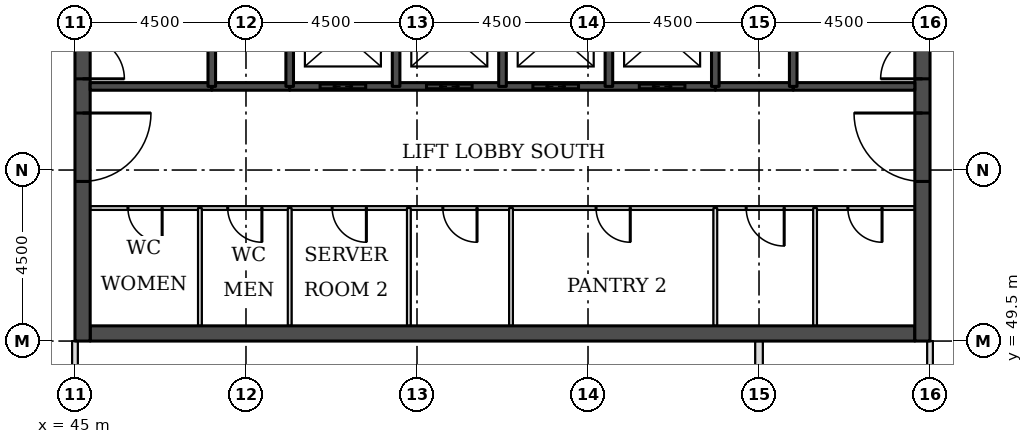
"""IFC4 building model, lengths in metres.
Left out: names, types, materials, properties, quantities, classifications, styles, units other than length and angle.
Written with IfcOpenShell. Run it as: python <this file> out.ifc"""

import sys

from ifc_helpers import new_model, si_unit, direction, frame, frame_2d, origin, place, context, subcontext, project, spatial, rectangle, extrude, element, fill, save


model = new_model("IFC4")
c1 = context("Model", 3, precision=1e-05, world=origin(), true_north=direction((0.0, 1.0)))
c2 = subcontext(c1, "Body", "Model", "MODEL_VIEW")
j1 = project(units=[si_unit("LENGTHUNIT", "METRE"), si_unit("PLANEANGLEUNIT", "RADIAN")], contexts=[c1])
p1 = place(None, origin())
s1 = spatial("IfcSite", under=j1, at=p1, CompositionType="ELEMENT")
p2 = place(p1, origin())
s2 = spatial("IfcBuilding", under=s1, at=p2, CompositionType="ELEMENT")
p3 = place(p2, frame((0.0, 0.0, 181.0)))
s3 = spatial("IfcBuildingStorey", under=s2, at=p3, CompositionType="ELEMENT", Elevation=181.0)
p4 = place(p3, frame((45.4, 49.7, 0.0), z_axis=(0.0, 0.0, 1.0), x_axis=(1.0, 0.0, 0.0)))
e1 = element("IfcWall", 1, at=p4, inside=s3, PredefinedType="SHEAR", context=c2, shape_type="SweptSolid", body=[
    extrude(rectangle(XDim=21.7, YDim=0.4, at=frame_2d((10.85, 0.0))), origin(), (0.0, 0.0, 1.0), 3.7),
])
p5 = place(p3, frame((45.2, 49.5, 0.0), z_axis=(0.0, 0.0, 1.0), x_axis=(0.0, 1.0, 0.0)))
e2 = element("IfcWall", 2, at=p5, inside=s3, PredefinedType="SHEAR", context=c2, shape_type="SweptSolid", body=[
    extrude(rectangle(XDim=22.5, YDim=0.4, at=frame_2d((11.25, 0.0))), origin(), (0.0, 0.0, 1.0), 3.7),
])
p6 = place(p5, frame((4.2, 0.0, 0.0)))
e3 = element("IfcOpeningElement", 3, at=p6, cuts=e2, PredefinedType="OPENING", context=c2, shape_type="SweptSolid", body=[
    extrude(rectangle(XDim=1.8, YDim=2.1, at=frame_2d((0.9, 1.05))), frame((0.0, 0.21, 0.0), z_axis=(0.0, -1.0, 0.0), x_axis=(1.0, 0.0, 0.0)), (0.0, 0.0, 1.0), 0.42),
])
p7 = place(p5, frame((6.9, 0.0, 0.0)))
e4 = element("IfcOpeningElement", 4, at=p7, cuts=e2, PredefinedType="OPENING", context=c2, shape_type="SweptSolid", body=[
    extrude(rectangle(XDim=1.1, YDim=2.1, at=frame_2d((0.55, 1.05))), frame((0.0, 0.21, 0.0), z_axis=(0.0, -1.0, 0.0), x_axis=(1.0, 0.0, 0.0)), (0.0, 0.0, 1.0), 0.42),
])
p8 = place(p5, frame((13.6, 0.0, 0.0)))
e5 = element("IfcOpeningElement", 5, at=p8, cuts=e2, PredefinedType="OPENING", context=c2, shape_type="SweptSolid", body=[
    extrude(rectangle(XDim=1.1, YDim=2.1, at=frame_2d((0.55, 1.05))), frame((0.0, 0.21, 0.0), z_axis=(0.0, -1.0, 0.0), x_axis=(1.0, 0.0, 0.0)), (0.0, 0.0, 1.0), 0.42),
])
p9 = place(p5, frame((16.5, 0.0, 0.0)))
e6 = element("IfcOpeningElement", 6, at=p9, cuts=e2, PredefinedType="OPENING", context=c2, shape_type="SweptSolid", body=[
    extrude(rectangle(XDim=1.8, YDim=2.1, at=frame_2d((0.9, 1.05))), frame((0.0, 0.21, 0.0), z_axis=(0.0, -1.0, 0.0), x_axis=(1.0, 0.0, 0.0)), (0.0, 0.0, 1.0), 0.42),
])
p10 = place(p3, frame((67.3, 49.5, 0.0), z_axis=(0.0, 0.0, 1.0), x_axis=(0.0, 1.0, 0.0)))
e7 = element("IfcWall", 7, at=p10, inside=s3, PredefinedType="SHEAR", context=c2, shape_type="SweptSolid", body=[
    extrude(rectangle(XDim=22.5, YDim=0.4, at=frame_2d((11.25, 0.0))), origin(), (0.0, 0.0, 1.0), 3.7),
])
p11 = place(p10, frame((4.2, 0.0, 0.0)))
e8 = element("IfcOpeningElement", 8, at=p11, cuts=e7, PredefinedType="OPENING", context=c2, shape_type="SweptSolid", body=[
    extrude(rectangle(XDim=1.8, YDim=2.1, at=frame_2d((0.9, 1.05))), frame((0.0, 0.21, 0.0), z_axis=(0.0, -1.0, 0.0), x_axis=(1.0, 0.0, 0.0)), (0.0, 0.0, 1.0), 0.42),
])
p12 = place(p10, frame((6.9, 0.0, 0.0)))
e9 = element("IfcOpeningElement", 9, at=p12, cuts=e7, PredefinedType="OPENING", context=c2, shape_type="SweptSolid", body=[
    extrude(rectangle(XDim=1.1, YDim=2.1, at=frame_2d((0.55, 1.05))), frame((0.0, 0.21, 0.0), z_axis=(0.0, -1.0, 0.0), x_axis=(1.0, 0.0, 0.0)), (0.0, 0.0, 1.0), 0.42),
])
p13 = place(p10, frame((13.6, 0.0, 0.0)))
e10 = element("IfcOpeningElement", 10, at=p13, cuts=e7, PredefinedType="OPENING", context=c2, shape_type="SweptSolid", body=[
    extrude(rectangle(XDim=1.1, YDim=2.1, at=frame_2d((0.55, 1.05))), frame((0.0, 0.21, 0.0), z_axis=(0.0, -1.0, 0.0), x_axis=(1.0, 0.0, 0.0)), (0.0, 0.0, 1.0), 0.42),
])
p14 = place(p10, frame((16.5, 0.0, 0.0)))
e11 = element("IfcOpeningElement", 11, at=p14, cuts=e7, PredefinedType="OPENING", context=c2, shape_type="SweptSolid", body=[
    extrude(rectangle(XDim=1.8, YDim=2.1, at=frame_2d((0.9, 1.05))), frame((0.0, 0.21, 0.0), z_axis=(0.0, -1.0, 0.0), x_axis=(1.0, 0.0, 0.0)), (0.0, 0.0, 1.0), 0.42),
])
p15 = place(p3, frame((67.5, 43.5, 0.0), z_axis=(0.0, 0.0, 1.0), x_axis=(0.0, 1.0, 0.0)))
e12 = element("IfcWall", 12, at=p15, inside=s3, PredefinedType="PARTITIONING", context=c2, shape_type="SweptSolid", body=[
    extrude(rectangle(XDim=6.0, YDim=0.15, at=frame_2d((3.0, 0.0))), origin(), (0.0, 0.0, 1.0), 3.022),
])
p16 = place(p15, frame((2.5, 0.0, 0.0)))
e13 = element("IfcOpeningElement", 13, at=p16, cuts=e12, PredefinedType="OPENING", context=c2, shape_type="SweptSolid", body=[
    extrude(rectangle(XDim=1.0, YDim=2.1, at=frame_2d((0.5, 1.05))), frame((0.0, 0.085, 0.0), z_axis=(0.0, -1.0, 0.0), x_axis=(1.0, 0.0, 0.0)), (0.0, 0.0, 1.0), 0.17),
])
p17 = place(p3, frame((45.0, 46.5, 0.0), z_axis=(0.0, 0.0, 1.0), x_axis=(0.0, 1.0, 0.0)))
e14 = element("IfcWall", 14, at=p17, inside=s3, PredefinedType="PARTITIONING", context=c2, shape_type="SweptSolid", body=[
    extrude(rectangle(XDim=3.0, YDim=0.15, at=frame_2d((1.5, 0.0))), origin(), (0.0, 0.0, 1.0), 3.022),
])
p18 = place(p17, frame((1.0, 0.0, 0.0)))
e15 = element("IfcOpeningElement", 15, at=p18, cuts=e14, PredefinedType="OPENING", context=c2, shape_type="SweptSolid", body=[
    extrude(rectangle(XDim=1.0, YDim=2.1, at=frame_2d((0.5, 1.05))), frame((0.0, 0.085, 0.0), z_axis=(0.0, -1.0, 0.0), x_axis=(1.0, 0.0, 0.0)), (0.0, 0.0, 1.0), 0.17),
])
p19 = place(p3, frame((63.0, 46.5, 0.0), z_axis=(0.0, 0.0, 1.0), x_axis=(0.0, 1.0, 0.0)))
e16 = element("IfcWall", 16, at=p19, inside=s3, PredefinedType="PARTITIONING", context=c2, shape_type="SweptSolid", body=[
    extrude(rectangle(XDim=3.0, YDim=0.2, at=frame_2d((1.5, 0.0))), origin(), (0.0, 0.0, 1.0), 3.55),
])
p20 = place(p3, frame((45.4, 53.0, 0.0), z_axis=(0.0, 0.0, 1.0), x_axis=(1.0, 0.0, 0.0)))
e17 = element("IfcWall", 17, at=p20, inside=s3, PredefinedType="PARTITIONING", context=c2, shape_type="SweptSolid", body=[
    extrude(rectangle(XDim=21.7, YDim=0.1, at=frame_2d((10.85, 0.0))), origin(), (0.0, 0.0, 1.0), 3.55),
])
p21 = place(p20, frame((19.938, 0.0, 0.0)))
e18 = element("IfcOpeningElement", 18, at=p21, cuts=e17, PredefinedType="OPENING", context=c2, shape_type="SweptSolid", body=[
    extrude(rectangle(XDim=0.9, YDim=2.1, at=frame_2d((0.45, 1.05))), frame((0.0, 0.06, 0.0), z_axis=(0.0, -1.0, 0.0), x_axis=(1.0, 0.0, 0.0)), (0.0, 0.0, 1.0), 0.12),
])
p22 = place(p20, frame((17.262, 0.0, 0.0)))
e19 = element("IfcOpeningElement", 19, at=p22, cuts=e17, PredefinedType="OPENING", context=c2, shape_type="SweptSolid", body=[
    extrude(rectangle(XDim=1.0, YDim=2.1, at=frame_2d((0.5, 1.05))), frame((0.0, 0.06, 0.0), z_axis=(0.0, -1.0, 0.0), x_axis=(1.0, 0.0, 0.0)), (0.0, 0.0, 1.0), 0.12),
])
p23 = place(p20, frame((0.994, 0.0, 0.0)))
e20 = element("IfcOpeningElement", 20, at=p23, cuts=e17, PredefinedType="OPENING", context=c2, shape_type="SweptSolid", body=[
    extrude(rectangle(XDim=0.9, YDim=2.1, at=frame_2d((0.45, 1.05))), frame((0.0, 0.06, 0.0), z_axis=(0.0, -1.0, 0.0), x_axis=(1.0, 0.0, 0.0)), (0.0, 0.0, 1.0), 0.12),
])
p24 = place(p20, frame((3.619, 0.0, 0.0)))
e21 = element("IfcOpeningElement", 21, at=p24, cuts=e17, PredefinedType="OPENING", context=c2, shape_type="SweptSolid", body=[
    extrude(rectangle(XDim=0.9, YDim=2.1, at=frame_2d((0.45, 1.05))), frame((0.0, 0.06, 0.0), z_axis=(0.0, -1.0, 0.0), x_axis=(1.0, 0.0, 0.0)), (0.0, 0.0, 1.0), 0.12),
])
p25 = place(p20, frame((6.368, 0.0, 0.0)))
e22 = element("IfcOpeningElement", 22, at=p25, cuts=e17, PredefinedType="OPENING", context=c2, shape_type="SweptSolid", body=[
    extrude(rectangle(XDim=0.9, YDim=2.1, at=frame_2d((0.45, 1.05))), frame((0.0, 0.06, 0.0), z_axis=(0.0, -1.0, 0.0), x_axis=(1.0, 0.0, 0.0)), (0.0, 0.0, 1.0), 0.12),
])
p26 = place(p20, frame((9.28, 0.0, 0.0)))
e23 = element("IfcOpeningElement", 23, at=p26, cuts=e17, PredefinedType="OPENING", context=c2, shape_type="SweptSolid", body=[
    extrude(rectangle(XDim=0.9, YDim=2.1, at=frame_2d((0.45, 1.05))), frame((0.0, 0.06, 0.0), z_axis=(0.0, -1.0, 0.0), x_axis=(1.0, 0.0, 0.0)), (0.0, 0.0, 1.0), 0.12),
])
p27 = place(p20, frame((13.312, 0.0, 0.0)))
e24 = element("IfcOpeningElement", 24, at=p27, cuts=e17, PredefinedType="OPENING", context=c2, shape_type="SweptSolid", body=[
    extrude(rectangle(XDim=0.9, YDim=2.1, at=frame_2d((0.45, 1.05))), frame((0.0, 0.06, 0.0), z_axis=(0.0, -1.0, 0.0), x_axis=(1.0, 0.0, 0.0)), (0.0, 0.0, 1.0), 0.12),
])
for number, where, z_axis, x_axis in (
    (25, (48.6, 56.2, 0.0), (0.0, 0.0, 1.0), (1.0, 0.0, 0.0)),
    (26, (61.85, 56.2, 0.0), (0.0, 0.0, 1.0), (1.0, 0.0, 0.0)),
):
    element("IfcWall", number, at=place(p3, frame(where, z_axis=z_axis, x_axis=x_axis)), inside=s3, PredefinedType="SOLIDWALL", context=c2, shape_type="SweptSolid", body=[
        extrude(rectangle(XDim=2.05, YDim=0.2, at=frame_2d((1.025, 0.0))), origin(), (0.0, 0.0, 1.0), 3.55),
    ])
p28 = place(p3, frame((45.4, 56.2, 0.0), z_axis=(0.0, 0.0, 1.0), x_axis=(1.0, 0.0, 0.0)))
e27 = element("IfcWall", 27, at=p28, inside=s3, PredefinedType="SOLIDWALL", context=c2, shape_type="SweptSolid", body=[
    extrude(rectangle(XDim=3.2, YDim=0.2, at=frame_2d((1.6, 0.0))), origin(), (0.0, 0.0, 1.0), 3.55),
])
p29 = place(p3, frame((50.65, 56.2, 0.0), z_axis=(0.0, 0.0, 1.0), x_axis=(1.0, 0.0, 0.0)))
e28 = element("IfcWall", 28, at=p29, inside=s3, PredefinedType="SOLIDWALL", context=c2, shape_type="SweptSolid", body=[
    extrude(rectangle(XDim=11.2, YDim=0.2, at=frame_2d((5.6, 0.0))), origin(), (0.0, 0.0, 1.0), 3.55),
])
p30 = place(p29, frame((0.8, 0.0, 0.0)))
e29 = element("IfcOpeningElement", 29, at=p30, cuts=e28, PredefinedType="OPENING", context=c2, shape_type="SweptSolid", body=[
    extrude(rectangle(XDim=1.2, YDim=2.1, at=frame_2d((0.6, 1.05))), frame((0.0, 0.11, 0.0), z_axis=(0.0, -1.0, 0.0), x_axis=(1.0, 0.0, 0.0)), (0.0, 0.0, 1.0), 0.22),
])
p31 = place(p29, frame((3.6, 0.0, 0.0)))
e30 = element("IfcOpeningElement", 30, at=p31, cuts=e28, PredefinedType="OPENING", context=c2, shape_type="SweptSolid", body=[
    extrude(rectangle(XDim=1.2, YDim=2.1, at=frame_2d((0.6, 1.05))), frame((0.0, 0.11, 0.0), z_axis=(0.0, -1.0, 0.0), x_axis=(1.0, 0.0, 0.0)), (0.0, 0.0, 1.0), 0.22),
])
p32 = place(p29, frame((6.4, 0.0, 0.0)))
e31 = element("IfcOpeningElement", 31, at=p32, cuts=e28, PredefinedType="OPENING", context=c2, shape_type="SweptSolid", body=[
    extrude(rectangle(XDim=1.2, YDim=2.1, at=frame_2d((0.6, 1.05))), frame((0.0, 0.11, 0.0), z_axis=(0.0, -1.0, 0.0), x_axis=(1.0, 0.0, 0.0)), (0.0, 0.0, 1.0), 0.22),
])
p33 = place(p29, frame((9.2, 0.0, 0.0)))
e32 = element("IfcOpeningElement", 32, at=p33, cuts=e28, PredefinedType="OPENING", context=c2, shape_type="SweptSolid", body=[
    extrude(rectangle(XDim=1.2, YDim=2.1, at=frame_2d((0.6, 1.05))), frame((0.0, 0.11, 0.0), z_axis=(0.0, -1.0, 0.0), x_axis=(1.0, 0.0, 0.0)), (0.0, 0.0, 1.0), 0.22),
])
p34 = place(p3, frame((63.9, 56.2, 0.0), z_axis=(0.0, 0.0, 1.0), x_axis=(1.0, 0.0, 0.0)))
e33 = element("IfcWall", 33, at=p34, inside=s3, PredefinedType="SOLIDWALL", context=c2, shape_type="SweptSolid", body=[
    extrude(rectangle(XDim=3.2, YDim=0.2, at=frame_2d((1.6, 0.0))), origin(), (0.0, 0.0, 1.0), 3.55),
])
p35 = place(p3, frame((48.288, 49.9, 0.0), z_axis=(0.0, 0.0, 1.0), x_axis=(0.0, 1.0, 0.0)))
e34 = element("IfcWall", 34, at=p35, inside=s3, PredefinedType="PARTITIONING", context=c2, shape_type="SweptSolid", body=[
    extrude(rectangle(XDim=3.1, YDim=0.1, at=frame_2d((1.55, 0.0))), origin(), (0.0, 0.0, 1.0), 3.55),
])
p36 = place(p3, frame((48.6, 56.2, 0.0), z_axis=(0.0, 0.0, 1.0), x_axis=(0.0, 1.0, 0.0)))
e35 = element("IfcWall", 35, at=p36, inside=s3, PredefinedType="SOLIDWALL", context=c2, shape_type="SweptSolid", body=[
    extrude(rectangle(XDim=5.8, YDim=0.2, at=frame_2d((2.9, 0.0))), origin(), (0.0, 0.0, 1.0), 3.55),
])
p37 = place(p3, frame((50.65, 49.9, 0.0), z_axis=(0.0, 0.0, 1.0), x_axis=(0.0, 1.0, 0.0)))
e36 = element("IfcWall", 36, at=p37, inside=s3, PredefinedType="PARTITIONING", context=c2, shape_type="SweptSolid", body=[
    extrude(rectangle(XDim=3.1, YDim=0.1, at=frame_2d((1.55, 0.0))), origin(), (0.0, 0.0, 1.0), 3.55),
])
for number, where, z_axis, x_axis in (
    (37, (50.65, 56.2, 0.0), (0.0, 0.0, 1.0), (0.0, 1.0, 0.0)),
    (38, (53.45, 56.2, 0.0), (0.0, 0.0, 1.0), (0.0, 1.0, 0.0)),
):
    element("IfcWall", number, at=place(p3, frame(where, z_axis=z_axis, x_axis=x_axis)), inside=s3, PredefinedType="SOLIDWALL", context=c2, shape_type="SweptSolid", body=[
        extrude(rectangle(XDim=2.8, YDim=0.2, at=frame_2d((1.4, 0.0))), origin(), (0.0, 0.0, 1.0), 3.55),
    ])
p38 = place(p3, frame((53.786, 49.9, 0.0), z_axis=(0.0, 0.0, 1.0), x_axis=(0.0, 1.0, 0.0)))
e39 = element("IfcWall", 39, at=p38, inside=s3, PredefinedType="PARTITIONING", context=c2, shape_type="SweptSolid", body=[
    extrude(rectangle(XDim=3.1, YDim=0.1, at=frame_2d((1.55, 0.0))), origin(), (0.0, 0.0, 1.0), 3.55),
])
p39 = place(p3, frame((56.25, 56.2, 0.0), z_axis=(0.0, 0.0, 1.0), x_axis=(0.0, 1.0, 0.0)))
e40 = element("IfcWall", 40, at=p39, inside=s3, PredefinedType="SOLIDWALL", context=c2, shape_type="SweptSolid", body=[
    extrude(rectangle(XDim=2.8, YDim=0.2, at=frame_2d((1.4, 0.0))), origin(), (0.0, 0.0, 1.0), 3.55),
])
p40 = place(p3, frame((56.474, 49.9, 0.0), z_axis=(0.0, 0.0, 1.0), x_axis=(0.0, 1.0, 0.0)))
e41 = element("IfcWall", 41, at=p40, inside=s3, PredefinedType="PARTITIONING", context=c2, shape_type="SweptSolid", body=[
    extrude(rectangle(XDim=3.1, YDim=0.1, at=frame_2d((1.55, 0.0))), origin(), (0.0, 0.0, 1.0), 3.55),
])
p41 = place(p3, frame((59.05, 56.2, 0.0), z_axis=(0.0, 0.0, 1.0), x_axis=(0.0, 1.0, 0.0)))
e42 = element("IfcWall", 42, at=p41, inside=s3, PredefinedType="SOLIDWALL", context=c2, shape_type="SweptSolid", body=[
    extrude(rectangle(XDim=2.8, YDim=0.2, at=frame_2d((1.4, 0.0))), origin(), (0.0, 0.0, 1.0), 3.55),
])
p42 = place(p3, frame((61.85, 49.9, 0.0), z_axis=(0.0, 0.0, 1.0), x_axis=(0.0, 1.0, 0.0)))
e43 = element("IfcWall", 43, at=p42, inside=s3, PredefinedType="PARTITIONING", context=c2, shape_type="SweptSolid", body=[
    extrude(rectangle(XDim=3.1, YDim=0.1, at=frame_2d((1.55, 0.0))), origin(), (0.0, 0.0, 1.0), 3.55),
])
p43 = place(p3, frame((61.85, 56.2, 0.0), z_axis=(0.0, 0.0, 1.0), x_axis=(0.0, 1.0, 0.0)))
e44 = element("IfcWall", 44, at=p43, inside=s3, PredefinedType="SOLIDWALL", context=c2, shape_type="SweptSolid", body=[
    extrude(rectangle(XDim=2.8, YDim=0.2, at=frame_2d((1.4, 0.0))), origin(), (0.0, 0.0, 1.0), 3.55),
])
p44 = place(p3, frame((63.9, 56.2, 0.0), z_axis=(0.0, 0.0, 1.0), x_axis=(0.0, 1.0, 0.0)))
e45 = element("IfcWall", 45, at=p44, inside=s3, PredefinedType="SOLIDWALL", context=c2, shape_type="SweptSolid", body=[
    extrude(rectangle(XDim=5.8, YDim=0.2, at=frame_2d((2.9, 0.0))), origin(), (0.0, 0.0, 1.0), 3.55),
])
p45 = place(p3, frame((64.475, 49.9, 0.0), z_axis=(0.0, 0.0, 1.0), x_axis=(0.0, 1.0, 0.0)))
e46 = element("IfcWall", 46, at=p45, inside=s3, PredefinedType="PARTITIONING", context=c2, shape_type="SweptSolid", body=[
    extrude(rectangle(XDim=3.1, YDim=0.1, at=frame_2d((1.55, 0.0))), origin(), (0.0, 0.0, 1.0), 3.55),
])
p46 = place(p30, origin())
e47 = element("IfcDoor", 47, at=p46, inside=s3, OperationType="DOUBLE_DOOR_SLIDING", PredefinedType="DOOR", context=c2, shape_type="SweptSolid", body=[
    extrude(rectangle(XDim=1.2, YDim=2.1, at=frame_2d((0.6, 1.05))), frame((0.0, 0.025, 0.0), z_axis=(0.0, -1.0, 0.0), x_axis=(1.0, 0.0, 0.0)), (0.0, 0.0, 1.0), 0.05),
])
fill(e29, e47)
p47 = place(p31, origin())
e48 = element("IfcDoor", 48, at=p47, inside=s3, OperationType="DOUBLE_DOOR_SLIDING", PredefinedType="DOOR", context=c2, shape_type="SweptSolid", body=[
    extrude(rectangle(XDim=1.2, YDim=2.1, at=frame_2d((0.6, 1.05))), frame((0.0, 0.025, 0.0), z_axis=(0.0, -1.0, 0.0), x_axis=(1.0, 0.0, 0.0)), (0.0, 0.0, 1.0), 0.05),
])
fill(e30, e48)
p48 = place(p32, origin())
e49 = element("IfcDoor", 49, at=p48, inside=s3, OperationType="DOUBLE_DOOR_SLIDING", PredefinedType="DOOR", context=c2, shape_type="SweptSolid", body=[
    extrude(rectangle(XDim=1.2, YDim=2.1, at=frame_2d((0.6, 1.05))), frame((0.0, 0.025, 0.0), z_axis=(0.0, -1.0, 0.0), x_axis=(1.0, 0.0, 0.0)), (0.0, 0.0, 1.0), 0.05),
])
fill(e31, e49)
p49 = place(p33, origin())
e50 = element("IfcDoor", 50, at=p49, inside=s3, OperationType="DOUBLE_DOOR_SLIDING", PredefinedType="DOOR", context=c2, shape_type="SweptSolid", body=[
    extrude(rectangle(XDim=1.2, YDim=2.1, at=frame_2d((0.6, 1.05))), frame((0.0, 0.025, 0.0), z_axis=(0.0, -1.0, 0.0), x_axis=(1.0, 0.0, 0.0)), (0.0, 0.0, 1.0), 0.05),
])
fill(e32, e50)
p50 = place(p6, frame((1.8, 0.0, 0.0), z_axis=(0.0, 0.0, 1.0), x_axis=(-1.0, 0.0, 0.0)))
e51 = element("IfcDoor", 51, at=p50, inside=s3, OperationType="SINGLE_SWING_LEFT", PredefinedType="DOOR", context=c2, shape_type="SweptSolid", body=[
    extrude(rectangle(XDim=1.8, YDim=2.1, at=frame_2d((0.9, 1.05))), frame((0.0, 0.025, 0.0), z_axis=(0.0, -1.0, 0.0), x_axis=(1.0, 0.0, 0.0)), (0.0, 0.0, 1.0), 0.05),
])
fill(e3, e51)
p51 = place(p7, frame((1.1, 0.0, 0.0), z_axis=(0.0, 0.0, 1.0), x_axis=(-1.0, 0.0, 0.0)))
e52 = element("IfcDoor", 52, at=p51, inside=s3, OperationType="SINGLE_SWING_RIGHT", PredefinedType="DOOR", context=c2, shape_type="SweptSolid", body=[
    extrude(rectangle(XDim=1.1, YDim=2.1, at=frame_2d((0.55, 1.05))), frame((0.0, 0.025, 0.0), z_axis=(0.0, -1.0, 0.0), x_axis=(1.0, 0.0, 0.0)), (0.0, 0.0, 1.0), 0.05),
])
fill(e4, e52)
p52 = place(p11, origin())
e53 = element("IfcDoor", 53, at=p52, inside=s3, OperationType="SINGLE_SWING_RIGHT", PredefinedType="DOOR", context=c2, shape_type="SweptSolid", body=[
    extrude(rectangle(XDim=1.8, YDim=2.1, at=frame_2d((0.9, 1.05))), frame((0.0, 0.025, 0.0), z_axis=(0.0, -1.0, 0.0), x_axis=(1.0, 0.0, 0.0)), (0.0, 0.0, 1.0), 0.05),
])
fill(e8, e53)
p53 = place(p12, origin())
e54 = element("IfcDoor", 54, at=p53, inside=s3, OperationType="SINGLE_SWING_LEFT", PredefinedType="DOOR", context=c2, shape_type="SweptSolid", body=[
    extrude(rectangle(XDim=1.1, YDim=2.1, at=frame_2d((0.55, 1.05))), frame((0.0, 0.025, 0.0), z_axis=(0.0, -1.0, 0.0), x_axis=(1.0, 0.0, 0.0)), (0.0, 0.0, 1.0), 0.05),
])
fill(e9, e54)
p54 = place(p21, frame((0.9, 0.0, 0.0), z_axis=(0.0, 0.0, 1.0), x_axis=(-1.0, 0.0, 0.0)))
e55 = element("IfcDoor", 55, at=p54, inside=s3, OperationType="SINGLE_SWING_LEFT", PredefinedType="DOOR", context=c2, shape_type="SweptSolid", body=[
    extrude(rectangle(XDim=0.9, YDim=2.1, at=frame_2d((0.45, 1.05))), frame((0.0, 0.025, 0.0), z_axis=(0.0, -1.0, 0.0), x_axis=(1.0, 0.0, 0.0)), (0.0, 0.0, 1.0), 0.05),
])
fill(e18, e55)
p55 = place(p22, frame((1.0, 0.0, 0.0), z_axis=(0.0, 0.0, 1.0), x_axis=(-1.0, 0.0, 0.0)))
e56 = element("IfcDoor", 56, at=p55, inside=s3, OperationType="SINGLE_SWING_LEFT", PredefinedType="DOOR", context=c2, shape_type="SweptSolid", body=[
    extrude(rectangle(XDim=1.0, YDim=2.1, at=frame_2d((0.5, 1.05))), frame((0.0, 0.025, 0.0), z_axis=(0.0, -1.0, 0.0), x_axis=(1.0, 0.0, 0.0)), (0.0, 0.0, 1.0), 0.05),
])
fill(e19, e56)
p56 = place(p23, frame((0.9, 0.0, 0.0), z_axis=(0.0, 0.0, 1.0), x_axis=(-1.0, 0.0, 0.0)))
e57 = element("IfcDoor", 57, at=p56, inside=s3, OperationType="SINGLE_SWING_LEFT", PredefinedType="DOOR", context=c2, shape_type="SweptSolid", body=[
    extrude(rectangle(XDim=0.9, YDim=2.1, at=frame_2d((0.45, 1.05))), frame((0.0, 0.025, 0.0), z_axis=(0.0, -1.0, 0.0), x_axis=(1.0, 0.0, 0.0)), (0.0, 0.0, 1.0), 0.05),
])
fill(e20, e57)
p57 = place(p24, frame((0.9, 0.0, 0.0), z_axis=(0.0, 0.0, 1.0), x_axis=(-1.0, 0.0, 0.0)))
e58 = element("IfcDoor", 58, at=p57, inside=s3, OperationType="SINGLE_SWING_LEFT", PredefinedType="DOOR", context=c2, shape_type="SweptSolid", body=[
    extrude(rectangle(XDim=0.9, YDim=2.1, at=frame_2d((0.45, 1.05))), frame((0.0, 0.025, 0.0), z_axis=(0.0, -1.0, 0.0), x_axis=(1.0, 0.0, 0.0)), (0.0, 0.0, 1.0), 0.05),
])
fill(e21, e58)
p58 = place(p25, frame((0.9, 0.0, 0.0), z_axis=(0.0, 0.0, 1.0), x_axis=(-1.0, 0.0, 0.0)))
e59 = element("IfcDoor", 59, at=p58, inside=s3, OperationType="SINGLE_SWING_LEFT", PredefinedType="DOOR", context=c2, shape_type="SweptSolid", body=[
    extrude(rectangle(XDim=0.9, YDim=2.1, at=frame_2d((0.45, 1.05))), frame((0.0, 0.025, 0.0), z_axis=(0.0, -1.0, 0.0), x_axis=(1.0, 0.0, 0.0)), (0.0, 0.0, 1.0), 0.05),
])
fill(e22, e59)
p59 = place(p26, frame((0.9, 0.0, 0.0), z_axis=(0.0, 0.0, 1.0), x_axis=(-1.0, 0.0, 0.0)))
e60 = element("IfcDoor", 60, at=p59, inside=s3, OperationType="SINGLE_SWING_LEFT", PredefinedType="DOOR", context=c2, shape_type="SweptSolid", body=[
    extrude(rectangle(XDim=0.9, YDim=2.1, at=frame_2d((0.45, 1.05))), frame((0.0, 0.025, 0.0), z_axis=(0.0, -1.0, 0.0), x_axis=(1.0, 0.0, 0.0)), (0.0, 0.0, 1.0), 0.05),
])
fill(e23, e60)
p60 = place(p27, frame((0.9, 0.0, 0.0), z_axis=(0.0, 0.0, 1.0), x_axis=(-1.0, 0.0, 0.0)))
e61 = element("IfcDoor", 61, at=p60, inside=s3, OperationType="SINGLE_SWING_LEFT", PredefinedType="DOOR", context=c2, shape_type="SweptSolid", body=[
    extrude(rectangle(XDim=0.9, YDim=2.1, at=frame_2d((0.45, 1.05))), frame((0.0, 0.025, 0.0), z_axis=(0.0, -1.0, 0.0), x_axis=(1.0, 0.0, 0.0)), (0.0, 0.0, 1.0), 0.05),
])
fill(e24, e61)
save(model, sys.argv[1])
